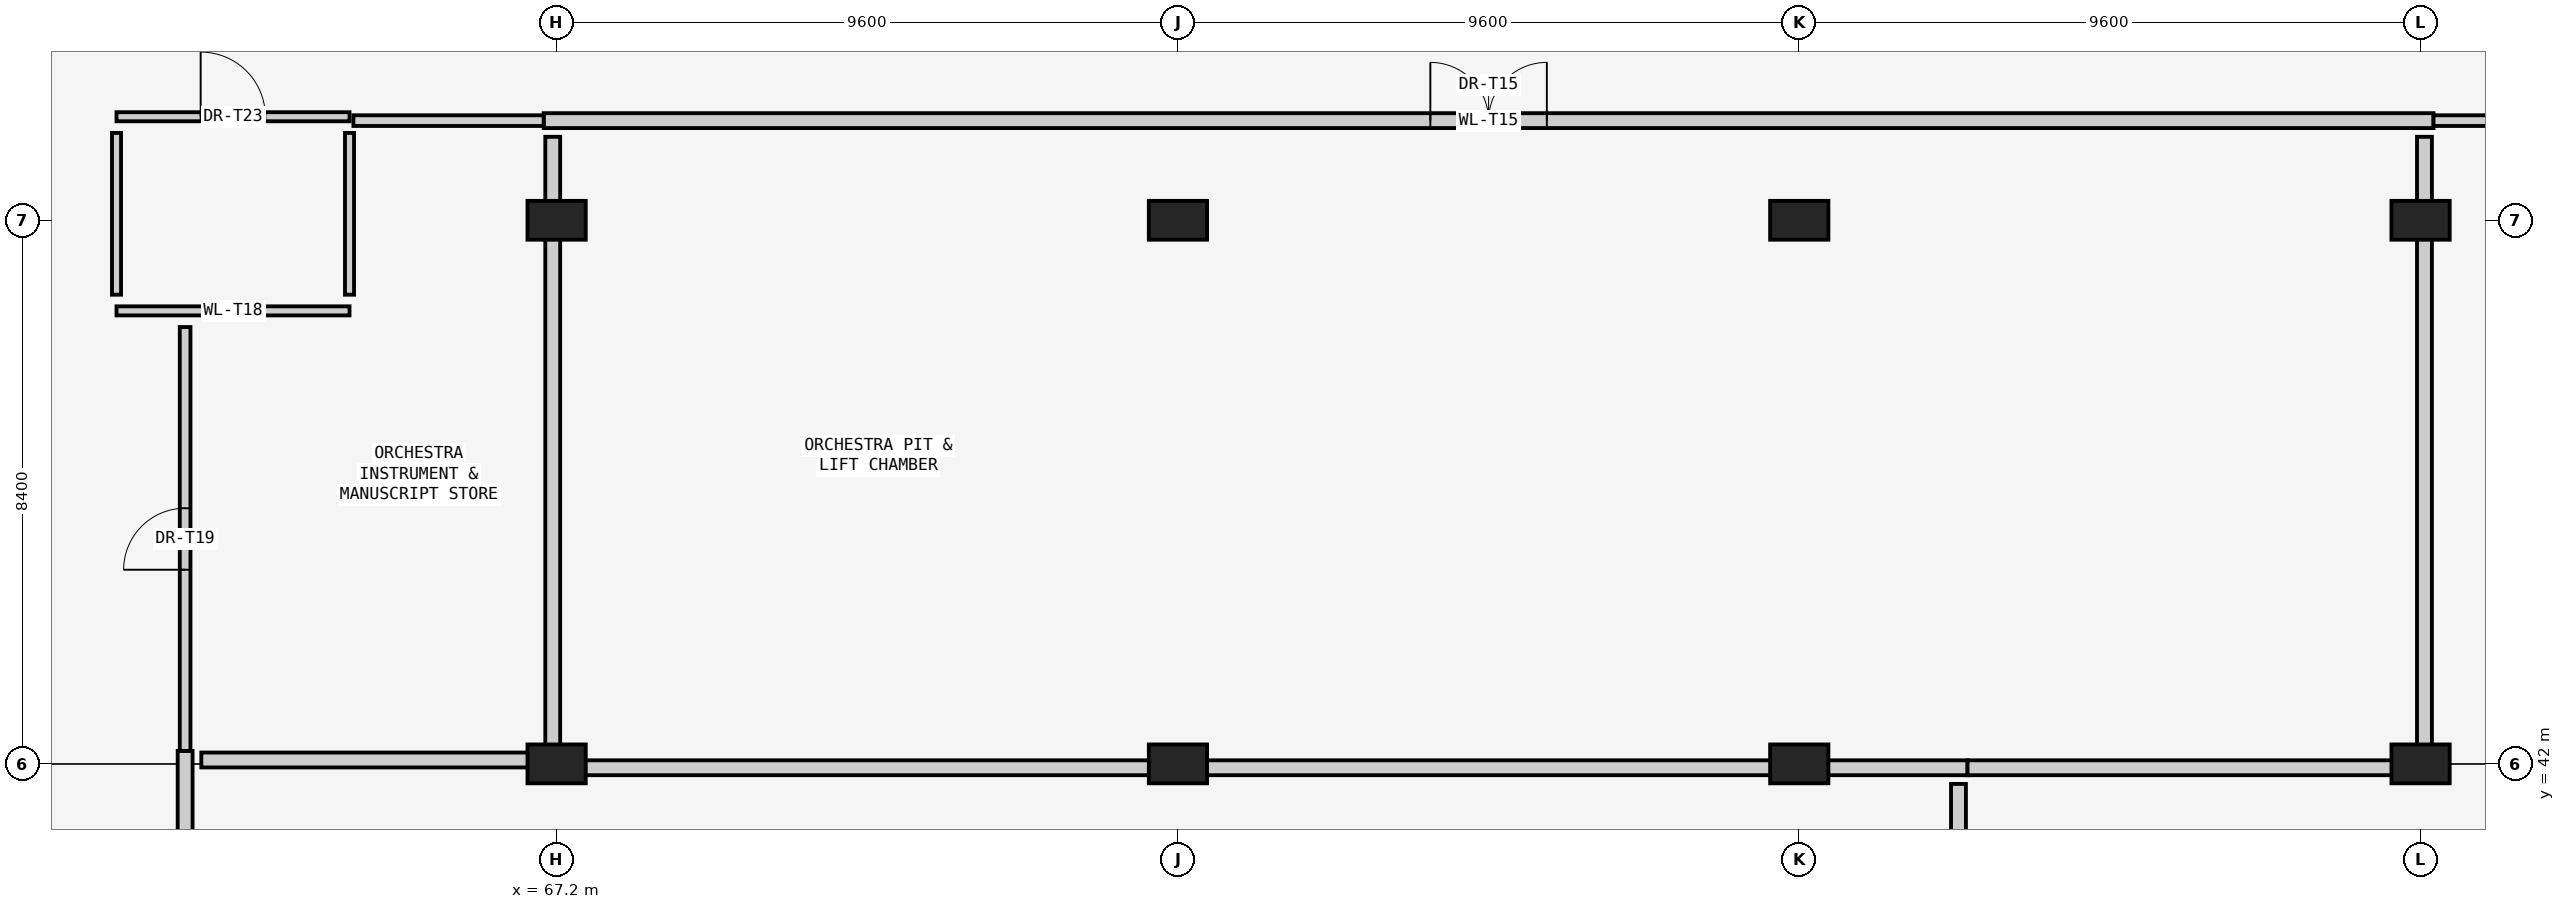
"""IFC4 building model, lengths in metres.
Left out: names, types, materials, properties, quantities, classifications, styles, units other than length and angle.
Written with IfcOpenShell. Run it as: python <this file> out.ifc"""

import sys

from ifc_helpers import new_model, si_unit, direction, frame, frame_2d, origin, origin_2d, place, context, subcontext, project, spatial, rectangle, extrude, element, fill, save


model = new_model("IFC4")
c1 = context("Model", 3, precision=1e-05, world=origin(), true_north=direction((0.0, 1.0)))
c2 = subcontext(c1, "Body", "Model", "MODEL_VIEW")
j1 = project(units=[si_unit("LENGTHUNIT", "METRE"), si_unit("PLANEANGLEUNIT", "RADIAN")], contexts=[c1])
p1 = place(None, origin())
s1 = spatial("IfcSite", under=j1, at=p1, CompositionType="ELEMENT")
p2 = place(p1, origin())
s2 = spatial("IfcBuilding", under=s1, at=p2, CompositionType="ELEMENT")
p3 = place(p2, frame((0.0, 0.0, -4.8)))
s3 = spatial("IfcBuildingStorey", under=s2, at=p3, CompositionType="ELEMENT", Elevation=-4.8)
for number, where, z_axis, x_axis in (
    (1, (67.2, 42.0, 0.0), (0.0, 0.0, 1.0), (1.0, 0.0, 0.0)),
    (2, (67.2, 50.4, 0.0), (0.0, 0.0, 1.0), (1.0, 0.0, 0.0)),
    (3, (76.8, 42.0, 0.0), (0.0, 0.0, 1.0), (1.0, 0.0, 0.0)),
    (4, (76.8, 50.4, 0.0), (0.0, 0.0, 1.0), (1.0, 0.0, 0.0)),
    (5, (86.4, 42.0, 0.0), (0.0, 0.0, 1.0), (1.0, 0.0, 0.0)),
    (6, (86.4, 50.4, 0.0), (0.0, 0.0, 1.0), (1.0, 0.0, 0.0)),
    (7, (96.0, 42.0, 0.0), (0.0, 0.0, 1.0), (1.0, 0.0, 0.0)),
    (8, (96.0, 50.4, 0.0), (0.0, 0.0, 1.0), (1.0, 0.0, 0.0)),
):
    element("IfcColumn", number, at=place(p3, frame(where, z_axis=z_axis, x_axis=x_axis)), inside=s3, PredefinedType="COLUMN", context=c2, shape_type="SweptSolid", body=[
        extrude(rectangle(XDim=0.9, YDim=0.6, at=origin_2d()), origin(), (0.0, 0.0, 1.0), 4.38),
    ])
p4 = place(p3, frame((60.4, 49.0, 0.0), z_axis=(0.0, 0.0, 1.0), x_axis=(1.0, 0.0, 0.0)))
e9 = element("IfcWall", 9, at=p4, inside=s3, PredefinedType="PARTITIONING", context=c2, shape_type="SweptSolid", body=[
    extrude(rectangle(XDim=3.6, YDim=0.14, at=frame_2d((1.8, 0.0))), origin(), (0.0, 0.0, 1.0), 4.32),
])
p5 = place(p3, frame((60.4, 52.0, 0.0), z_axis=(0.0, 0.0, 1.0), x_axis=(1.0, 0.0, 0.0)))
e10 = element("IfcWall", 10, at=p5, inside=s3, PredefinedType="PARTITIONING", context=c2, shape_type="SweptSolid", body=[
    extrude(rectangle(XDim=3.6, YDim=0.14, at=frame_2d((1.8, 0.0))), origin(), (0.0, 0.0, 1.0), 4.32),
])
p6 = place(p5, frame((1.3, 0.0, 0.0)))
e11 = element("IfcOpeningElement", 11, at=p6, cuts=e10, PredefinedType="OPENING", context=c2, shape_type="SweptSolid", body=[
    extrude(rectangle(XDim=1.0, YDim=2.15, at=frame_2d((0.5, 1.075))), frame((0.0, 0.08, 0.0), z_axis=(0.0, -1.0, 0.0), x_axis=(1.0, 0.0, 0.0)), (0.0, 0.0, 1.0), 0.16),
])
for number, where, z_axis, x_axis in (
    (12, (60.4, 49.25, 0.0), (0.0, 0.0, 1.0), (0.0, 1.0, 0.0)),
    (13, (64.0, 49.25, 0.0), (0.0, 0.0, 1.0), (0.0, 1.0, 0.0)),
):
    element("IfcWall", number, at=place(p3, frame(where, z_axis=z_axis, x_axis=x_axis)), inside=s3, PredefinedType="PARTITIONING", context=c2, shape_type="SweptSolid", body=[
        extrude(rectangle(XDim=2.5, YDim=0.14, at=frame_2d((1.25, 0.0))), origin(), (0.0, 0.0, 1.0), 4.32),
    ])
p7 = place(p3, frame((67.0, 51.94, 0.0), z_axis=(0.0, 0.0, 1.0), x_axis=(1.0, 0.0, 0.0)))
e14 = element("IfcWall", 14, at=p7, inside=s3, PredefinedType="SOLIDWALL", context=c2, shape_type="SweptSolid", body=[
    extrude(rectangle(XDim=29.2, YDim=0.23, at=frame_2d((14.6, 0.0))), origin(), (0.0, 0.0, 1.0), 4.33),
])
p8 = place(p7, frame((13.7, 0.0, 0.0)))
e15 = element("IfcOpeningElement", 15, at=p8, cuts=e14, PredefinedType="OPENING", context=c2, shape_type="SweptSolid", body=[
    extrude(rectangle(XDim=1.8, YDim=2.3, at=frame_2d((0.9, 1.15))), frame((0.0, 0.125, 0.0), z_axis=(0.0, -1.0, 0.0), x_axis=(1.0, 0.0, 0.0)), (0.0, 0.0, 1.0), 0.25),
])
p9 = place(p3, frame((61.46, 25.2, 0.0), z_axis=(0.0, 0.0, 1.0), x_axis=(0.0, 1.0, 0.0)))
e16 = element("IfcWall", 16, at=p9, inside=s3, PredefinedType="SOLIDWALL", context=c2, shape_type="SweptSolid", body=[
    extrude(rectangle(XDim=17.0, YDim=0.23, at=frame_2d((8.5, 0.0))), origin(), (0.0, 0.0, 1.0), 4.33),
])
p10 = place(p3, frame((96.2, 51.94, 0.0), z_axis=(0.0, 0.0, 1.0), x_axis=(1.0, 0.0, 0.0)))
e17 = element("IfcWall", 17, at=p10, inside=s3, PredefinedType="PARTITIONING", context=c2, shape_type="SweptSolid", body=[
    extrude(rectangle(XDim=9.41, YDim=0.165, at=frame_2d((4.705, 0.0))), origin(), (0.0, 0.0, 1.0), 4.33),
])
p11 = place(p3, frame((64.06, 51.94, 0.0), z_axis=(0.0, 0.0, 1.0), x_axis=(1.0, 0.0, 0.0)))
e18 = element("IfcWall", 18, at=p11, inside=s3, PredefinedType="PARTITIONING", context=c2, shape_type="SweptSolid", body=[
    extrude(rectangle(XDim=2.94, YDim=0.165, at=frame_2d((1.47, 0.0))), origin(), (0.0, 0.0, 1.0), 4.33),
])
p12 = place(p3, frame((61.46, 42.2, 0.0), z_axis=(0.0, 0.0, 1.0), x_axis=(0.0, 1.0, 0.0)))
e19 = element("IfcWall", 19, at=p12, inside=s3, PredefinedType="PARTITIONING", context=c2, shape_type="SweptSolid", body=[
    extrude(rectangle(XDim=6.55, YDim=0.165, at=frame_2d((3.275, 0.0))), origin(), (0.0, 0.0, 1.0), 4.33),
])
p13 = place(p12, frame((2.8, 0.0, 0.0)))
e20 = element("IfcOpeningElement", 20, at=p13, cuts=e19, PredefinedType="OPENING", context=c2, shape_type="SweptSolid", body=[
    extrude(rectangle(XDim=0.95, YDim=2.15, at=frame_2d((0.475, 1.075))), frame((0.0, 0.093, 0.0), z_axis=(0.0, -1.0, 0.0), x_axis=(1.0, 0.0, 0.0)), (0.0, 0.0, 1.0), 0.185),
])
p14 = place(p3, frame((67.2, 41.94, 0.0), z_axis=(0.0, 0.0, 1.0), x_axis=(1.0, 0.0, 0.0)))
e21 = element("IfcWall", 21, at=p14, inside=s3, PredefinedType="SOLIDWALL", context=c2, shape_type="SweptSolid", body=[
    extrude(rectangle(XDim=21.8, YDim=0.23, at=frame_2d((10.9, 0.0))), origin(), (0.0, 0.0, 1.0), 3.36),
])
p15 = place(p3, frame((96.06, 42.0, 0.0), z_axis=(0.0, 0.0, 1.0), x_axis=(0.0, 1.0, 0.0)))
e22 = element("IfcWall", 22, at=p15, inside=s3, PredefinedType="SOLIDWALL", context=c2, shape_type="SweptSolid", body=[
    extrude(rectangle(XDim=9.69, YDim=0.23, at=frame_2d((4.845, 0.0))), origin(), (0.0, 0.0, 1.0), 3.56),
])
p16 = place(p3, frame((89.0, 41.94, 0.0), z_axis=(0.0, 0.0, 1.0), x_axis=(1.0, 0.0, 0.0)))
e23 = element("IfcWall", 23, at=p16, inside=s3, PredefinedType="SOLIDWALL", context=c2, shape_type="SweptSolid", body=[
    extrude(rectangle(XDim=7.0, YDim=0.23, at=frame_2d((3.5, 0.0))), origin(), (0.0, 0.0, 1.0), 3.36),
])
p17 = place(p3, frame((67.14, 42.0, 0.0), z_axis=(0.0, 0.0, 1.0), x_axis=(0.0, 1.0, 0.0)))
e24 = element("IfcWall", 24, at=p17, inside=s3, PredefinedType="SOLIDWALL", context=c2, shape_type="SweptSolid", body=[
    extrude(rectangle(XDim=9.69, YDim=0.23, at=frame_2d((4.845, 0.0))), origin(), (0.0, 0.0, 1.0), 3.56),
])
p18 = place(p3, frame((88.86, 23.85, 0.0), z_axis=(0.0, 0.0, 1.0), x_axis=(0.0, 1.0, 0.0)))
e25 = element("IfcWall", 25, at=p18, inside=s3, PredefinedType="SOLIDWALL", context=c2, shape_type="SweptSolid", body=[
    extrude(rectangle(XDim=17.84, YDim=0.23, at=frame_2d((8.92, 0.0))), origin(), (0.0, 0.0, 1.0), 4.33),
])
p19 = place(p3, frame((61.71, 42.06, 0.0), z_axis=(0.0, 0.0, 1.0), x_axis=(1.0, 0.0, 0.0)))
e26 = element("IfcWall", 26, at=p19, inside=s3, PredefinedType="SOLIDWALL", context=c2, shape_type="SweptSolid", body=[
    extrude(rectangle(XDim=5.18, YDim=0.23, at=frame_2d((2.59, 0.0))), origin(), (0.0, 0.0, 1.0), 3.36),
])
p20 = place(p6, origin())
e27 = element("IfcDoor", 27, at=p20, inside=s3, OperationType="SINGLE_SWING_LEFT", PredefinedType="DOOR", context=c2, shape_type="SweptSolid", body=[
    extrude(rectangle(XDim=1.0, YDim=2.15, at=frame_2d((0.5, 1.075))), frame((0.0, 0.025, 0.0), z_axis=(0.0, -1.0, 0.0), x_axis=(1.0, 0.0, 0.0)), (0.0, 0.0, 1.0), 0.05),
])
fill(e11, e27)
p21 = place(p8, origin())
e28 = element("IfcDoor", 28, at=p21, inside=s3, OperationType="DOUBLE_SWING_LEFT", PredefinedType="DOOR", context=c2, shape_type="SweptSolid", body=[
    extrude(rectangle(XDim=1.8, YDim=2.3, at=frame_2d((0.9, 1.15))), frame((0.0, 0.025, 0.0), z_axis=(0.0, -1.0, 0.0), x_axis=(1.0, 0.0, 0.0)), (0.0, 0.0, 1.0), 0.05),
])
fill(e15, e28)
p22 = place(p13, origin())
e29 = element("IfcDoor", 29, at=p22, inside=s3, OperationType="SINGLE_SWING_LEFT", PredefinedType="DOOR", context=c2, shape_type="SweptSolid", body=[
    extrude(rectangle(XDim=0.95, YDim=2.15, at=frame_2d((0.475, 1.075))), frame((0.0, 0.025, 0.0), z_axis=(0.0, -1.0, 0.0), x_axis=(1.0, 0.0, 0.0)), (0.0, 0.0, 1.0), 0.05),
])
fill(e20, e29)
save(model, sys.argv[1])
